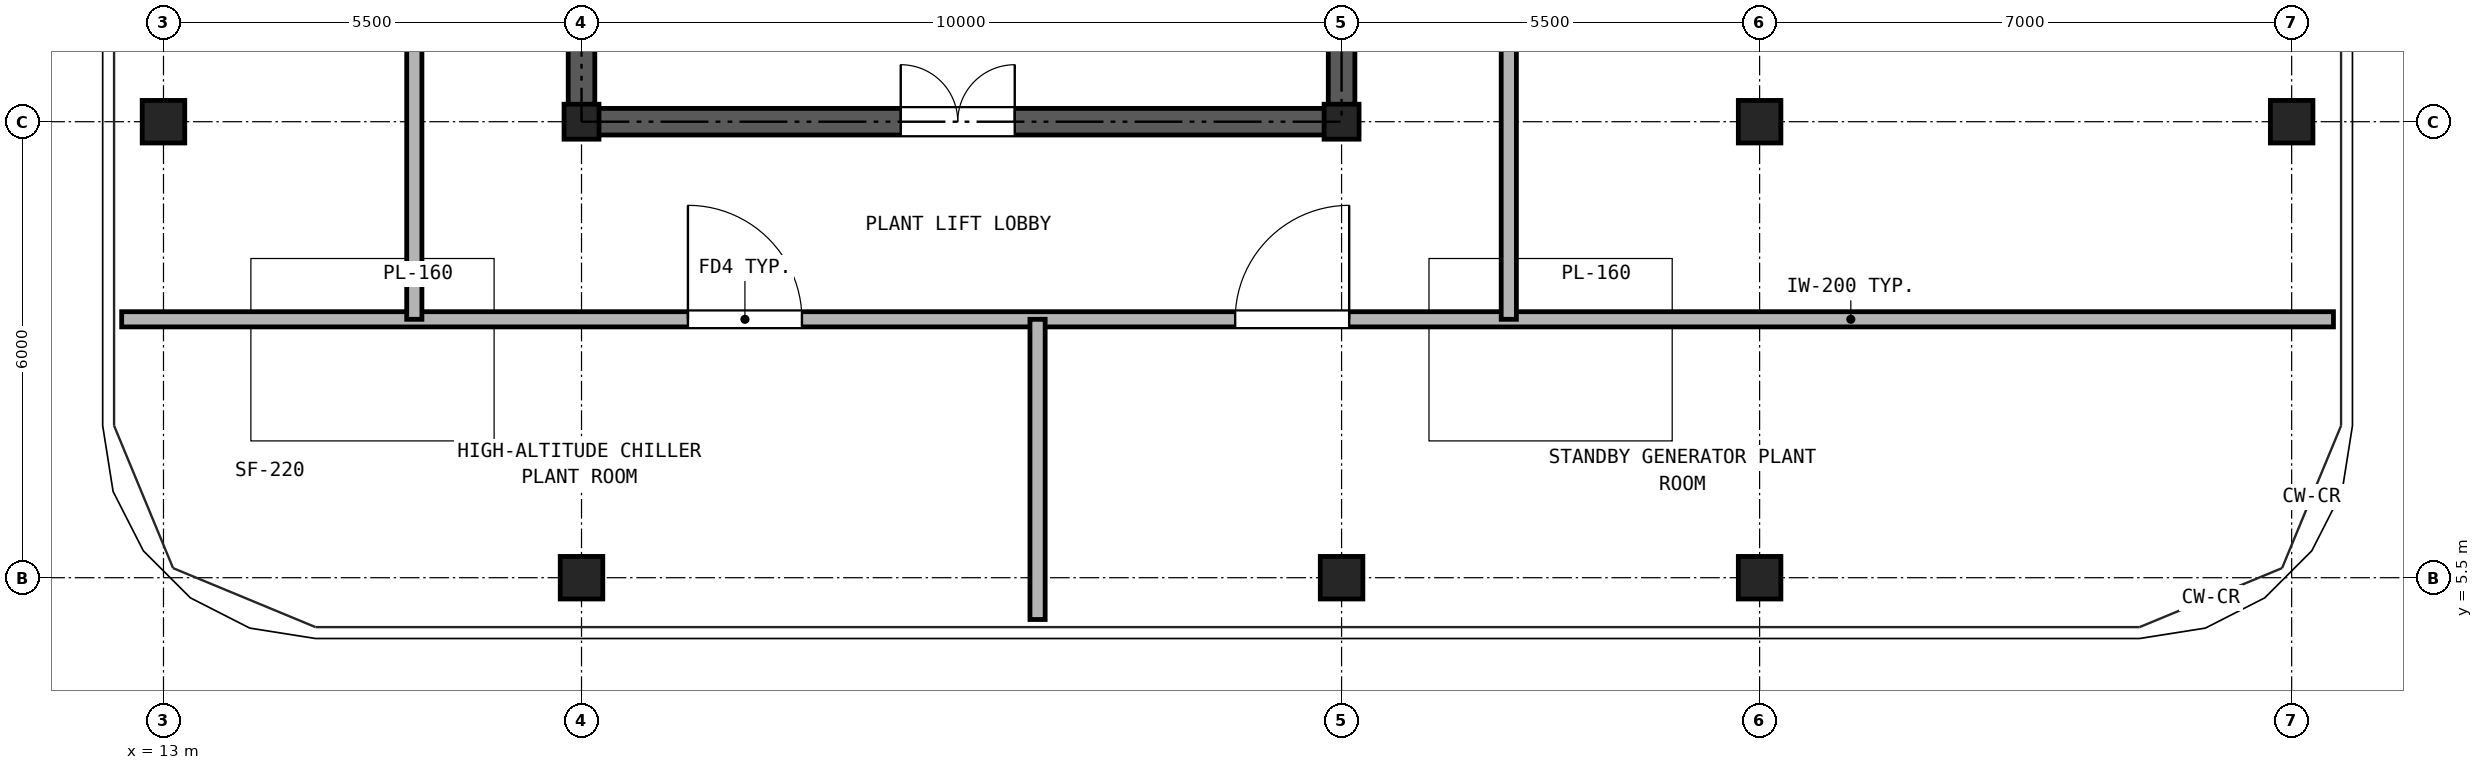
"""IFC4 building model, lengths in metres.
Left out: names, types, materials, properties, quantities, classifications, styles, units other than length and angle.
Written with IfcOpenShell. Run it as: python <this file> out.ifc"""

import sys

from ifc_helpers import new_model, si_unit, direction, frame, frame_2d, origin, origin_2d, place, context, subcontext, project, spatial, rectangle, hollow_rectangle, extrude, source, transform, mapped, element, fill, save


model = new_model("IFC4")
c1 = context("Model", 3, precision=1e-05, world=origin(), true_north=direction((0.0, 1.0)))
c2 = subcontext(c1, "Body", "Model", "MODEL_VIEW")
j1 = project(units=[si_unit("LENGTHUNIT", "METRE"), si_unit("PLANEANGLEUNIT", "RADIAN")], contexts=[c1])
p1 = place(None, origin())
s1 = spatial("IfcSite", under=j1, at=p1, CompositionType="ELEMENT")
p2 = place(p1, origin())
s2 = spatial("IfcBuilding", under=s1, at=p2, CompositionType="ELEMENT")
p3 = place(p2, frame((0.0, 0.0, 282.1)))
s3 = spatial("IfcBuildingStorey", under=s2, at=p3, CompositionType="ELEMENT", Elevation=282.1)
m1 = source(origin(), c2, "Body", "SweptSolid", [
    extrude(hollow_rectangle(XDim=0.56, YDim=0.56, WallThickness=0.03, at=origin_2d()), origin(), (0.0, 0.0, 1.0), 3.38),
])
for number, where, z_axis, x_axis in (
    (1, (18.5, 5.5, 0.0), (0.0, 0.0, 1.0), (1.0, 0.0, 0.0)),
    (2, (28.5, 5.5, 0.0), (0.0, 0.0, 1.0), (1.0, 0.0, 0.0)),
    (3, (34.0, 5.5, 0.0), (0.0, 0.0, 1.0), (1.0, 0.0, 0.0)),
    (4, (13.0, 11.5, 0.0), (0.0, 0.0, 1.0), (1.0, 0.0, 0.0)),
    (5, (41.0, 11.5, 0.0), (0.0, 0.0, 1.0), (1.0, 0.0, 0.0)),
):
    element("IfcColumn", number, at=place(p3, frame(where, z_axis=z_axis, x_axis=x_axis)), inside=s3, PredefinedType="COLUMN", context=c2, shape_type="MappedRepresentation", body=[
        mapped(m1, transform((0.0, 0.0, 0.0), x_axis=(1.0, 0.0, 0.0), y_axis=(0.0, 1.0, 0.0), z_axis=(0.0, 0.0, 1.0), scale=1.0)),
    ])
m2 = source(origin(), c2, "Body", "SweptSolid", [
    extrude(hollow_rectangle(XDim=0.46, YDim=0.46, WallThickness=0.025, at=origin_2d()), origin(), (0.0, 0.0, 1.0), 3.38),
])
for number, where, z_axis, x_axis in (
    (6, (18.5, 11.5, 0.0), (0.0, 0.0, 1.0), (1.0, 0.0, 0.0)),
    (7, (28.5, 11.5, 0.0), (0.0, 0.0, 1.0), (1.0, 0.0, 0.0)),
):
    element("IfcColumn", number, at=place(p3, frame(where, z_axis=z_axis, x_axis=x_axis)), inside=s3, PredefinedType="COLUMN", context=c2, shape_type="MappedRepresentation", body=[
        mapped(m2, transform((0.0, 0.0, 0.0), x_axis=(1.0, 0.0, 0.0), y_axis=(0.0, 1.0, 0.0), z_axis=(0.0, 0.0, 1.0), scale=1.0)),
    ])
p4 = place(p3, frame((34.0, 11.5, 0.0), z_axis=(0.0, 0.0, 1.0), x_axis=(1.0, 0.0, 0.0)))
e8 = element("IfcColumn", 8, at=p4, inside=s3, PredefinedType="COLUMN", context=c2, shape_type="MappedRepresentation", body=[
    mapped(m1, transform((0.0, 0.0, 0.0), x_axis=(1.0, 0.0, 0.0), y_axis=(0.0, 1.0, 0.0), z_axis=(0.0, 0.0, 1.0), scale=1.0)),
])
p5 = place(p3, frame((18.325, 11.5, 0.0), z_axis=(0.0, 0.0, 1.0), x_axis=(1.0, 0.0, 0.0)))
e9 = element("IfcWall", 9, at=p5, inside=s3, PredefinedType="SHEAR", context=c2, shape_type="SweptSolid", body=[
    extrude(rectangle(XDim=10.35, YDim=0.35, at=frame_2d((5.175, 0.0))), origin(), (0.0, 0.0, 1.0), 3.38),
])
p6 = place(p5, frame((4.375, 0.0, 0.0)))
e10 = element("IfcOpeningElement", 10, at=p6, cuts=e9, PredefinedType="OPENING", context=c2, shape_type="SweptSolid", body=[
    extrude(rectangle(XDim=1.5, YDim=2.25, at=frame_2d((0.75, 1.125))), frame((0.0, 0.185, 0.0), z_axis=(0.0, -1.0, 0.0), x_axis=(1.0, 0.0, 0.0)), (0.0, 0.0, 1.0), 0.37),
])
p7 = place(p3, frame((18.5, 11.675, 0.0), z_axis=(0.0, 0.0, 1.0), x_axis=(0.0, 1.0, 0.0)))
e11 = element("IfcWall", 11, at=p7, inside=s3, PredefinedType="SHEAR", context=c2, shape_type="SweptSolid", body=[
    extrude(rectangle(XDim=16.9, YDim=0.35, at=frame_2d((8.45, 0.0))), origin(), (0.0, 0.0, 1.0), 3.38),
])
p8 = place(p7, frame((7.475, 0.0, 0.0)))
e12 = element("IfcOpeningElement", 12, at=p8, cuts=e11, PredefinedType="OPENING", context=c2, shape_type="SweptSolid", body=[
    extrude(rectangle(XDim=1.15, YDim=2.2, at=frame_2d((0.575, 1.1))), frame((0.0, 0.185, 0.0), z_axis=(0.0, -1.0, 0.0), x_axis=(1.0, 0.0, 0.0)), (0.0, 0.0, 1.0), 0.37),
])
p9 = place(p3, frame((28.5, 11.675, 0.0), z_axis=(0.0, 0.0, 1.0), x_axis=(0.0, 1.0, 0.0)))
e13 = element("IfcWall", 13, at=p9, inside=s3, PredefinedType="SHEAR", context=c2, shape_type="SweptSolid", body=[
    extrude(rectangle(XDim=16.9, YDim=0.35, at=frame_2d((8.45, 0.0))), origin(), (0.0, 0.0, 1.0), 3.38),
])
p10 = place(p9, frame((7.475, 0.0, 0.0)))
e14 = element("IfcOpeningElement", 14, at=p10, cuts=e13, PredefinedType="OPENING", context=c2, shape_type="SweptSolid", body=[
    extrude(rectangle(XDim=1.15, YDim=2.2, at=frame_2d((0.575, 1.1))), frame((0.0, 0.185, 0.0), z_axis=(0.0, -1.0, 0.0), x_axis=(1.0, 0.0, 0.0)), (0.0, 0.0, 1.0), 0.37),
])
p11 = place(p3, frame((12.45, 8.9, 0.0), z_axis=(0.0, 0.0, 1.0), x_axis=(1.0, 0.0, 0.0)))
e15 = element("IfcWall", 15, at=p11, inside=s3, PredefinedType="PARTITIONING", context=c2, shape_type="SweptSolid", body=[
    extrude(rectangle(XDim=29.1, YDim=0.2, at=frame_2d((14.55, 0.0))), origin(), (0.0, 0.0, 1.0), 3.38),
])
p12 = place(p11, frame((7.45, 0.0, 0.0)))
e16 = element("IfcOpeningElement", 16, at=p12, cuts=e15, PredefinedType="OPENING", context=c2, shape_type="SweptSolid", body=[
    extrude(rectangle(XDim=1.5, YDim=2.25, at=frame_2d((0.75, 1.125))), frame((0.0, 0.11, 0.0), z_axis=(0.0, -1.0, 0.0), x_axis=(1.0, 0.0, 0.0)), (0.0, 0.0, 1.0), 0.22),
])
p13 = place(p11, frame((14.65, 0.0, 0.0)))
e17 = element("IfcOpeningElement", 17, at=p13, cuts=e15, PredefinedType="OPENING", context=c2, shape_type="SweptSolid", body=[
    extrude(rectangle(XDim=1.5, YDim=2.25, at=frame_2d((0.75, 1.125))), frame((0.0, 0.11, 0.0), z_axis=(0.0, -1.0, 0.0), x_axis=(1.0, 0.0, 0.0)), (0.0, 0.0, 1.0), 0.22),
])
p14 = place(p3, frame((16.3, 8.9, 0.0), z_axis=(0.0, 0.0, 1.0), x_axis=(0.0, 1.0, 0.0)))
e18 = element("IfcWall", 18, at=p14, inside=s3, PredefinedType="PARTITIONING", context=c2, shape_type="SweptSolid", body=[
    extrude(rectangle(XDim=19.85, YDim=0.2, at=frame_2d((9.925, 0.0))), origin(), (0.0, 0.0, 1.0), 3.38),
])
p15 = place(p14, frame((4.55, 0.0, 0.0)))
e19 = element("IfcOpeningElement", 19, at=p15, cuts=e18, PredefinedType="OPENING", context=c2, shape_type="SweptSolid", body=[
    extrude(rectangle(XDim=1.05, YDim=2.15, at=frame_2d((0.525, 1.075))), frame((0.0, 0.11, 0.0), z_axis=(0.0, -1.0, 0.0), x_axis=(1.0, 0.0, 0.0)), (0.0, 0.0, 1.0), 0.22),
])
p16 = place(p14, frame((14.475, 0.0, 0.0)))
e20 = element("IfcOpeningElement", 20, at=p16, cuts=e18, PredefinedType="OPENING", context=c2, shape_type="SweptSolid", body=[
    extrude(rectangle(XDim=1.05, YDim=2.15, at=frame_2d((0.525, 1.075))), frame((0.0, 0.11, 0.0), z_axis=(0.0, -1.0, 0.0), x_axis=(1.0, 0.0, 0.0)), (0.0, 0.0, 1.0), 0.22),
])
p17 = place(p3, frame((30.7, 8.9, 0.0), z_axis=(0.0, 0.0, 1.0), x_axis=(0.0, 1.0, 0.0)))
e21 = element("IfcWall", 21, at=p17, inside=s3, PredefinedType="PARTITIONING", context=c2, shape_type="SweptSolid", body=[
    extrude(rectangle(XDim=19.85, YDim=0.2, at=frame_2d((9.925, 0.0))), origin(), (0.0, 0.0, 1.0), 3.38),
])
p18 = place(p17, frame((9.425, 0.0, 0.0)))
e22 = element("IfcOpeningElement", 22, at=p18, cuts=e21, PredefinedType="OPENING", context=c2, shape_type="SweptSolid", body=[
    extrude(rectangle(XDim=1.05, YDim=2.15, at=frame_2d((0.525, 1.075))), frame((0.0, 0.11, 0.0), z_axis=(0.0, -1.0, 0.0), x_axis=(1.0, 0.0, 0.0)), (0.0, 0.0, 1.0), 0.22),
])
p19 = place(p3, frame((24.5, 4.95, 0.0), z_axis=(0.0, 0.0, 1.0), x_axis=(0.0, 1.0, 0.0)))
e23 = element("IfcWall", 23, at=p19, inside=s3, PredefinedType="PARTITIONING", context=c2, shape_type="SweptSolid", body=[
    extrude(rectangle(XDim=3.95, YDim=0.2, at=frame_2d((1.975, 0.0))), origin(), (0.0, 0.0, 1.0), 3.38),
])
p20 = place(p6, frame((1.5, 0.0, 0.0), z_axis=(0.0, 0.0, 1.0), x_axis=(-1.0, 0.0, 0.0)))
e24 = element("IfcDoor", 24, at=p20, inside=s3, OperationType="DOUBLE_DOOR_SINGLE_SWING", PredefinedType="DOOR", context=c2, shape_type="SweptSolid", body=[
    extrude(rectangle(XDim=1.5, YDim=2.25, at=frame_2d((0.75, 1.125))), frame((0.0, 0.025, 0.0), z_axis=(0.0, -1.0, 0.0), x_axis=(1.0, 0.0, 0.0)), (0.0, 0.0, 1.0), 0.05),
])
fill(e10, e24)
p21 = place(p12, frame((1.5, 0.0, 0.0), z_axis=(0.0, 0.0, 1.0), x_axis=(-1.0, 0.0, 0.0)))
e25 = element("IfcDoor", 25, at=p21, inside=s3, OperationType="SINGLE_SWING_LEFT", PredefinedType="DOOR", context=c2, shape_type="SweptSolid", body=[
    extrude(rectangle(XDim=1.5, YDim=2.25, at=frame_2d((0.75, 1.125))), frame((0.0, 0.025, 0.0), z_axis=(0.0, -1.0, 0.0), x_axis=(1.0, 0.0, 0.0)), (0.0, 0.0, 1.0), 0.05),
])
fill(e16, e25)
p22 = place(p13, frame((1.5, 0.0, 0.0), z_axis=(0.0, 0.0, 1.0), x_axis=(-1.0, 0.0, 0.0)))
e26 = element("IfcDoor", 26, at=p22, inside=s3, OperationType="SINGLE_SWING_RIGHT", PredefinedType="DOOR", context=c2, shape_type="SweptSolid", body=[
    extrude(rectangle(XDim=1.5, YDim=2.25, at=frame_2d((0.75, 1.125))), frame((0.0, 0.025, 0.0), z_axis=(0.0, -1.0, 0.0), x_axis=(1.0, 0.0, 0.0)), (0.0, 0.0, 1.0), 0.05),
])
fill(e17, e26)
save(model, sys.argv[1])
